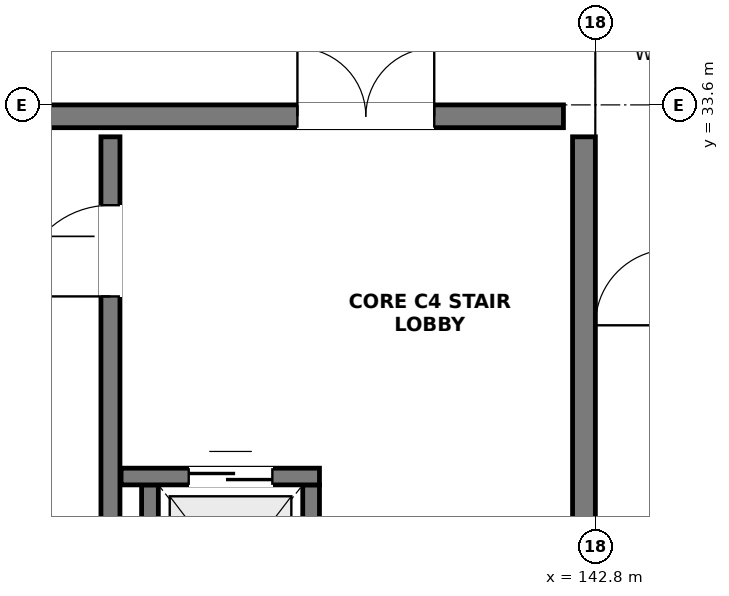
"""IFC4 building model, lengths in metres.
Left out: names, types, materials, properties, quantities, classifications, styles, units other than length and angle.
Written with IfcOpenShell. Run it as: python <this file> out.ifc"""

import sys

from ifc_helpers import new_model, si_unit, direction, frame, frame_2d, origin, place, context, subcontext, project, spatial, rectangle, extrude, element, fill, save


model = new_model("IFC4")
c1 = context("Model", 3, precision=1e-05, world=origin(), true_north=direction((0.0, 1.0)))
c2 = subcontext(c1, "Body", "Model", "MODEL_VIEW")
j1 = project(units=[si_unit("LENGTHUNIT", "METRE"), si_unit("PLANEANGLEUNIT", "RADIAN")], contexts=[c1])
p1 = place(None, origin())
s1 = spatial("IfcSite", under=j1, at=p1, CompositionType="ELEMENT")
p2 = place(p1, origin())
s2 = spatial("IfcBuilding", under=s1, at=p2, CompositionType="ELEMENT")
p3 = place(p2, frame((0.0, 0.0, 18.3)))
s3 = spatial("IfcBuildingStorey", under=s2, at=p3, CompositionType="ELEMENT", Elevation=18.3)
p4 = place(p3, frame((126.45, 33.45, 0.0), z_axis=(0.0, 0.0, 1.0), x_axis=(1.0, 0.0, 0.0)))
e1 = element("IfcWall", 1, at=p4, inside=s3, PredefinedType="SHEAR", context=c2, shape_type="SweptSolid", body=[
    extrude(rectangle(XDim=15.93, YDim=0.3, at=frame_2d((7.965, 0.0))), origin(), (0.0, 0.0, 1.0), 3.08),
])
p5 = place(p4, frame((12.43, 0.0, 0.0)))
e2 = element("IfcOpeningElement", 2, at=p5, cuts=e1, PredefinedType="OPENING", context=c2, shape_type="SweptSolid", body=[
    extrude(rectangle(XDim=1.8, YDim=2.2, at=frame_2d((0.9, 1.1))), frame((0.0, 0.162, 0.0), z_axis=(0.0, -1.0, 0.0), x_axis=(1.0, 0.0, 0.0)), (0.0, 0.0, 1.0), 0.324),
])
p6 = place(p3, frame((142.65, 25.62, 0.0), z_axis=(0.0, 0.0, 1.0), x_axis=(0.0, 1.0, 0.0)))
e3 = element("IfcWall", 3, at=p6, inside=s3, PredefinedType="SHEAR", context=c2, shape_type="SweptSolid", body=[
    extrude(rectangle(XDim=7.56, YDim=0.3, at=frame_2d((3.78, 0.0))), origin(), (0.0, 0.0, 1.0), 3.08),
])
p7 = place(p3, frame((136.42, 25.62, 0.0), z_axis=(0.0, 0.0, 1.0), x_axis=(0.0, 1.0, 0.0)))
e4 = element("IfcWall", 4, at=p7, inside=s3, PredefinedType="SHEAR", context=c2, shape_type="SweptSolid", body=[
    extrude(rectangle(XDim=7.56, YDim=0.25, at=frame_2d((3.78, 0.0))), origin(), (0.0, 0.0, 1.0), 3.08),
])
p8 = place(p7, frame((5.46, 0.0, 0.0)))
e5 = element("IfcOpeningElement", 5, at=p8, cuts=e4, PredefinedType="OPENING", context=c2, shape_type="SweptSolid", body=[
    extrude(rectangle(XDim=1.2, YDim=2.2, at=frame_2d((0.6, 1.1))), frame((0.0, 0.137, 0.0), z_axis=(0.0, -1.0, 0.0), x_axis=(1.0, 0.0, 0.0)), (0.0, 0.0, 1.0), 0.274),
])
for number, where, z_axis, x_axis in (
    (6, (136.94, 26.2, 0.0), (0.0, 0.0, 1.0), (0.0, 1.0, 0.0)),
    (7, (139.06, 26.2, 0.0), (0.0, 0.0, 1.0), (0.0, 1.0, 0.0)),
):
    element("IfcWall", number, at=place(p3, frame(where, z_axis=z_axis, x_axis=x_axis)), inside=s3, PredefinedType="SOLIDWALL", context=c2, shape_type="SweptSolid", body=[
        extrude(rectangle(XDim=2.4, YDim=0.22, at=frame_2d((1.2, 0.0))), origin(), (0.0, 0.0, 1.0), 3.08),
    ])
p9 = place(p3, frame((136.56, 28.71, 0.0), z_axis=(0.0, 0.0, 1.0), x_axis=(1.0, 0.0, 0.0)))
e8 = element("IfcWall", 8, at=p9, inside=s3, PredefinedType="SOLIDWALL", context=c2, shape_type="SweptSolid", body=[
    extrude(rectangle(XDim=2.61, YDim=0.22, at=frame_2d((1.305, 0.0))), origin(), (0.0, 0.0, 1.0), 3.08),
])
p10 = place(p9, frame((0.89, 0.0, 0.0)))
e9 = element("IfcOpeningElement", 9, at=p10, cuts=e8, PredefinedType="OPENING", context=c2, shape_type="SweptSolid", body=[
    extrude(rectangle(XDim=1.1, YDim=2.15, at=frame_2d((0.55, 1.075))), frame((0.0, 0.122, 0.0), z_axis=(0.0, -1.0, 0.0), x_axis=(1.0, 0.0, 0.0)), (0.0, 0.0, 1.0), 0.244),
])
p11 = place(p5, origin())
e10 = element("IfcDoor", 10, at=p11, inside=s3, OperationType="DOUBLE_DOOR_SINGLE_SWING", PredefinedType="DOOR", context=c2, shape_type="SweptSolid", body=[
    extrude(rectangle(XDim=1.8, YDim=2.2, at=frame_2d((0.9, 1.1))), frame((0.0, 0.025, 0.0), z_axis=(0.0, -1.0, 0.0), x_axis=(1.0, 0.0, 0.0)), (0.0, 0.0, 1.0), 0.05),
])
fill(e2, e10)
p12 = place(p8, origin())
e11 = element("IfcDoor", 11, at=p12, inside=s3, OperationType="SINGLE_SWING_LEFT", PredefinedType="DOOR", context=c2, shape_type="SweptSolid", body=[
    extrude(rectangle(XDim=1.2, YDim=2.2, at=frame_2d((0.6, 1.1))), frame((0.0, 0.025, 0.0), z_axis=(0.0, -1.0, 0.0), x_axis=(1.0, 0.0, 0.0)), (0.0, 0.0, 1.0), 0.05),
])
fill(e5, e11)
p13 = place(p10, origin())
e12 = element("IfcDoor", 12, at=p13, inside=s3, OperationType="DOUBLE_DOOR_SLIDING", PredefinedType="DOOR", context=c2, shape_type="SweptSolid", body=[
    extrude(rectangle(XDim=1.1, YDim=2.15, at=frame_2d((0.55, 1.075))), frame((0.0, 0.025, 0.0), z_axis=(0.0, -1.0, 0.0), x_axis=(1.0, 0.0, 0.0)), (0.0, 0.0, 1.0), 0.05),
])
fill(e9, e12)
save(model, sys.argv[1])
